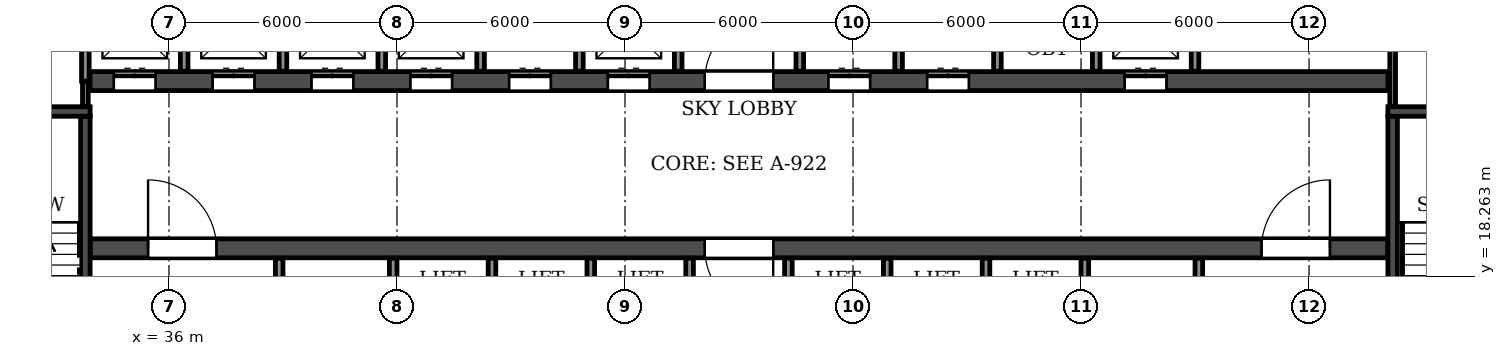
"""IFC4 building model, lengths in metres.
Left out: names, types, materials, properties, quantities, classifications, styles, units other than length and angle.
Written with IfcOpenShell. Run it as: python <this file> out.ifc"""

import sys

from ifc_helpers import new_model, si_unit, direction, frame, frame_2d, origin, place, context, subcontext, project, spatial, rectangle, extrude, element, fill, save


model = new_model("IFC4")
c1 = context("Model", 3, precision=1e-05, world=origin(), true_north=direction((0.0, 1.0)))
c2 = subcontext(c1, "Body", "Model", "MODEL_VIEW")
j1 = project(units=[si_unit("LENGTHUNIT", "METRE"), si_unit("PLANEANGLEUNIT", "RADIAN")], contexts=[c1])
p1 = place(None, origin())
s1 = spatial("IfcSite", under=j1, at=p1, CompositionType="ELEMENT")
p2 = place(p1, origin())
s2 = spatial("IfcBuilding", under=s1, at=p2, CompositionType="ELEMENT")
p3 = place(p2, frame((0.0, 0.0, 115.8)))
s3 = spatial("IfcBuildingStorey", under=s2, at=p3, CompositionType="ELEMENT", Elevation=115.8)
p4 = place(p3, frame((33.925, 19.0, 0.0), z_axis=(0.0, 0.0, 1.0), x_axis=(1.0, 0.0, 0.0)))
e1 = element("IfcWall", 1, at=p4, inside=s3, PredefinedType="SOLIDWALL", context=c2, shape_type="SweptSolid", body=[
    extrude(rectangle(XDim=34.15, YDim=0.5, at=frame_2d((17.075, 0.0))), origin(), (0.0, 0.0, 1.0), 6.37),
])
p5 = place(p4, frame((16.175, 0.0, 0.0)))
e2 = element("IfcOpeningElement", 2, at=p5, cuts=e1, PredefinedType="OPENING", context=c2, shape_type="SweptSolid", body=[
    extrude(rectangle(XDim=1.8, YDim=2.1, at=frame_2d((0.9, 1.05))), frame((0.0, 0.26, 0.0), z_axis=(0.0, -1.0, 0.0), x_axis=(1.0, 0.0, 0.0)), (0.0, 0.0, 1.0), 0.52),
])
p6 = place(p4, frame((1.525, 0.0, 0.0)))
e3 = element("IfcOpeningElement", 3, at=p6, cuts=e1, PredefinedType="OPENING", context=c2, shape_type="SweptSolid", body=[
    extrude(rectangle(XDim=1.8, YDim=2.1, at=frame_2d((0.9, 1.05))), frame((0.0, 0.26, 0.0), z_axis=(0.0, -1.0, 0.0), x_axis=(1.0, 0.0, 0.0)), (0.0, 0.0, 1.0), 0.52),
])
p7 = place(p4, frame((30.825, 0.0, 0.0)))
e4 = element("IfcOpeningElement", 4, at=p7, cuts=e1, PredefinedType="OPENING", context=c2, shape_type="SweptSolid", body=[
    extrude(rectangle(XDim=1.8, YDim=2.1, at=frame_2d((0.9, 1.05))), frame((0.0, 0.26, 0.0), z_axis=(0.0, -1.0, 0.0), x_axis=(1.0, 0.0, 0.0)), (0.0, 0.0, 1.0), 0.52),
])
p8 = place(p3, frame((33.925, 23.4, 0.0), z_axis=(0.0, 0.0, 1.0), x_axis=(1.0, 0.0, 0.0)))
e5 = element("IfcWall", 5, at=p8, inside=s3, PredefinedType="SOLIDWALL", context=c2, shape_type="SweptSolid", body=[
    extrude(rectangle(XDim=34.15, YDim=0.5, at=frame_2d((17.075, 0.0))), origin(), (0.0, 0.0, 1.0), 6.37),
])
p9 = place(p8, frame((16.175, 0.0, 0.0)))
e6 = element("IfcOpeningElement", 6, at=p9, cuts=e5, PredefinedType="OPENING", context=c2, shape_type="SweptSolid", body=[
    extrude(rectangle(XDim=1.8, YDim=2.1, at=frame_2d((0.9, 1.05))), frame((0.0, 0.26, 0.0), z_axis=(0.0, -1.0, 0.0), x_axis=(1.0, 0.0, 0.0)), (0.0, 0.0, 1.0), 0.52),
])
p10 = place(p8, frame((0.625, 0.0, 0.0)))
e7 = element("IfcOpeningElement", 7, at=p10, cuts=e5, PredefinedType="OPENING", context=c2, shape_type="SweptSolid", body=[
    extrude(rectangle(XDim=1.1, YDim=2.1, at=frame_2d((0.55, 1.05))), frame((0.0, 0.26, 0.0), z_axis=(0.0, -1.0, 0.0), x_axis=(1.0, 0.0, 0.0)), (0.0, 0.0, 1.0), 0.52),
])
p11 = place(p8, frame((3.225, 0.0, 0.0)))
e8 = element("IfcOpeningElement", 8, at=p11, cuts=e5, PredefinedType="OPENING", context=c2, shape_type="SweptSolid", body=[
    extrude(rectangle(XDim=1.1, YDim=2.1, at=frame_2d((0.55, 1.05))), frame((0.0, 0.26, 0.0), z_axis=(0.0, -1.0, 0.0), x_axis=(1.0, 0.0, 0.0)), (0.0, 0.0, 1.0), 0.52),
])
p12 = place(p8, frame((5.825, 0.0, 0.0)))
e9 = element("IfcOpeningElement", 9, at=p12, cuts=e5, PredefinedType="OPENING", context=c2, shape_type="SweptSolid", body=[
    extrude(rectangle(XDim=1.1, YDim=2.1, at=frame_2d((0.55, 1.05))), frame((0.0, 0.26, 0.0), z_axis=(0.0, -1.0, 0.0), x_axis=(1.0, 0.0, 0.0)), (0.0, 0.0, 1.0), 0.52),
])
p13 = place(p8, frame((8.425, 0.0, 0.0)))
e10 = element("IfcOpeningElement", 10, at=p13, cuts=e5, PredefinedType="OPENING", context=c2, shape_type="SweptSolid", body=[
    extrude(rectangle(XDim=1.1, YDim=2.1, at=frame_2d((0.55, 1.05))), frame((0.0, 0.26, 0.0), z_axis=(0.0, -1.0, 0.0), x_axis=(1.0, 0.0, 0.0)), (0.0, 0.0, 1.0), 0.52),
])
p14 = place(p8, frame((11.025, 0.0, 0.0)))
e11 = element("IfcOpeningElement", 11, at=p14, cuts=e5, PredefinedType="OPENING", context=c2, shape_type="SweptSolid", body=[
    extrude(rectangle(XDim=1.1, YDim=2.1, at=frame_2d((0.55, 1.05))), frame((0.0, 0.26, 0.0), z_axis=(0.0, -1.0, 0.0), x_axis=(1.0, 0.0, 0.0)), (0.0, 0.0, 1.0), 0.52),
])
p15 = place(p8, frame((13.625, 0.0, 0.0)))
e12 = element("IfcOpeningElement", 12, at=p15, cuts=e5, PredefinedType="OPENING", context=c2, shape_type="SweptSolid", body=[
    extrude(rectangle(XDim=1.1, YDim=2.1, at=frame_2d((0.55, 1.05))), frame((0.0, 0.26, 0.0), z_axis=(0.0, -1.0, 0.0), x_axis=(1.0, 0.0, 0.0)), (0.0, 0.0, 1.0), 0.52),
])
p16 = place(p8, frame((19.425, 0.0, 0.0)))
e13 = element("IfcOpeningElement", 13, at=p16, cuts=e5, PredefinedType="OPENING", context=c2, shape_type="SweptSolid", body=[
    extrude(rectangle(XDim=1.1, YDim=2.1, at=frame_2d((0.55, 1.05))), frame((0.0, 0.26, 0.0), z_axis=(0.0, -1.0, 0.0), x_axis=(1.0, 0.0, 0.0)), (0.0, 0.0, 1.0), 0.52),
])
p17 = place(p8, frame((22.025, 0.0, 0.0)))
e14 = element("IfcOpeningElement", 14, at=p17, cuts=e5, PredefinedType="OPENING", context=c2, shape_type="SweptSolid", body=[
    extrude(rectangle(XDim=1.1, YDim=2.1, at=frame_2d((0.55, 1.05))), frame((0.0, 0.26, 0.0), z_axis=(0.0, -1.0, 0.0), x_axis=(1.0, 0.0, 0.0)), (0.0, 0.0, 1.0), 0.52),
])
p18 = place(p8, frame((27.225, 0.0, 0.0)))
e15 = element("IfcOpeningElement", 15, at=p18, cuts=e5, PredefinedType="OPENING", context=c2, shape_type="SweptSolid", body=[
    extrude(rectangle(XDim=1.1, YDim=2.1, at=frame_2d((0.55, 1.05))), frame((0.0, 0.26, 0.0), z_axis=(0.0, -1.0, 0.0), x_axis=(1.0, 0.0, 0.0)), (0.0, 0.0, 1.0), 0.52),
])
p19 = place(p3, frame((33.8, 14.85, 0.0), z_axis=(0.0, 0.0, 1.0), x_axis=(0.0, 1.0, 0.0)))
e16 = element("IfcWall", 16, at=p19, inside=s3, PredefinedType="SOLIDWALL", context=c2, shape_type="SweptSolid", body=[
    extrude(rectangle(XDim=7.625, YDim=0.25, at=frame_2d((3.812, 0.0))), origin(), (0.0, 0.0, 1.0), 6.37),
])
p20 = place(p19, frame((0.45, 0.0, 0.0)))
e17 = element("IfcOpeningElement", 17, at=p20, cuts=e16, PredefinedType="OPENING", context=c2, shape_type="SweptSolid", body=[
    extrude(rectangle(XDim=1.0, YDim=2.1, at=frame_2d((0.5, 1.05))), frame((0.0, 0.135, 0.0), z_axis=(0.0, -1.0, 0.0), x_axis=(1.0, 0.0, 0.0)), (0.0, 0.0, 1.0), 0.27),
])
p21 = place(p3, frame((29.875, 22.6, 0.0), z_axis=(0.0, 0.0, 1.0), x_axis=(1.0, 0.0, 0.0)))
e18 = element("IfcWall", 18, at=p21, inside=s3, PredefinedType="SOLIDWALL", context=c2, shape_type="SweptSolid", body=[
    extrude(rectangle(XDim=4.05, YDim=0.25, at=frame_2d((2.025, 0.0))), origin(), (0.0, 0.0, 1.0), 6.37),
])
p22 = place(p3, frame((68.2, 14.85, 0.0), z_axis=(0.0, 0.0, 1.0), x_axis=(0.0, 1.0, 0.0)))
e19 = element("IfcWall", 19, at=p22, inside=s3, PredefinedType="SOLIDWALL", context=c2, shape_type="SweptSolid", body=[
    extrude(rectangle(XDim=7.625, YDim=0.25, at=frame_2d((3.812, 0.0))), origin(), (0.0, 0.0, 1.0), 6.37),
])
p23 = place(p22, frame((0.45, 0.0, 0.0)))
e20 = element("IfcOpeningElement", 20, at=p23, cuts=e19, PredefinedType="OPENING", context=c2, shape_type="SweptSolid", body=[
    extrude(rectangle(XDim=1.0, YDim=2.1, at=frame_2d((0.5, 1.05))), frame((0.0, 0.135, 0.0), z_axis=(0.0, -1.0, 0.0), x_axis=(1.0, 0.0, 0.0)), (0.0, 0.0, 1.0), 0.27),
])
p24 = place(p3, frame((68.075, 22.6, 0.0), z_axis=(0.0, 0.0, 1.0), x_axis=(1.0, 0.0, 0.0)))
e21 = element("IfcWall", 21, at=p24, inside=s3, PredefinedType="SOLIDWALL", context=c2, shape_type="SweptSolid", body=[
    extrude(rectangle(XDim=4.05, YDim=0.25, at=frame_2d((2.025, 0.0))), origin(), (0.0, 0.0, 1.0), 6.37),
])
p25 = place(p3, frame((33.8, 22.735, 0.0), z_axis=(0.0, 0.0, 1.0), x_axis=(0.0, 1.0, 0.0)))
e22 = element("IfcWall", 22, at=p25, inside=s3, PredefinedType="PARTITIONING", context=c2, shape_type="SweptSolid", body=[
    extrude(rectangle(XDim=0.665, YDim=0.15, at=frame_2d((0.333, 0.0))), origin(), (0.0, 0.0, 1.0), 6.37),
])
p26 = place(p3, frame((68.2, 22.735, 0.0), z_axis=(0.0, 0.0, 1.0), x_axis=(0.0, 1.0, 0.0)))
e23 = element("IfcWall", 23, at=p26, inside=s3, PredefinedType="PARTITIONING", context=c2, shape_type="SweptSolid", body=[
    extrude(rectangle(XDim=4.755, YDim=0.15, at=frame_2d((2.377, 0.0))), origin(), (0.0, 0.0, 1.0), 6.37),
])
p27 = place(p3, frame((33.8, 23.4, 0.0), z_axis=(0.0, 0.0, 1.0), x_axis=(0.0, 1.0, 0.0)))
e24 = element("IfcWall", 24, at=p27, inside=s3, PredefinedType="PARTITIONING", context=c2, shape_type="SweptSolid", body=[
    extrude(rectangle(XDim=2.7, YDim=0.2, at=frame_2d((1.35, 0.0))), origin(), (0.0, 0.0, 1.0), 6.37),
])
p28 = place(p3, frame((36.4, 23.66, 0.0), z_axis=(0.0, 0.0, 1.0), x_axis=(0.0, 1.0, 0.0)))
e25 = element("IfcWall", 25, at=p28, inside=s3, PredefinedType="PARTITIONING", context=c2, shape_type="SweptSolid", body=[
    extrude(rectangle(XDim=2.44, YDim=0.2, at=frame_2d((1.22, 0.0))), origin(), (0.0, 0.0, 1.0), 6.37),
])
p29 = place(p3, frame((38.9, 14.91, 0.0), z_axis=(0.0, 0.0, 1.0), x_axis=(0.0, 1.0, 0.0)))
e26 = element("IfcWall", 26, at=p29, inside=s3, PredefinedType="PARTITIONING", context=c2, shape_type="SweptSolid", body=[
    extrude(rectangle(XDim=3.83, YDim=0.2, at=frame_2d((1.915, 0.0))), origin(), (0.0, 0.0, 1.0), 6.37),
])
p30 = place(p29, frame((1.34, 0.0, 0.0)))
e27 = element("IfcOpeningElement", 27, at=p30, cuts=e26, PredefinedType="OPENING", context=c2, shape_type="SweptSolid", body=[
    extrude(rectangle(XDim=1.1, YDim=2.1, at=frame_2d((0.55, 1.05))), frame((0.0, 0.11, 0.0), z_axis=(0.0, -1.0, 0.0), x_axis=(1.0, 0.0, 0.0)), (0.0, 0.0, 1.0), 0.22),
])
for number, where, z_axis, x_axis in (
    (28, (39.0, 23.66, 0.0), (0.0, 0.0, 1.0), (0.0, 1.0, 0.0)),
    (29, (41.6, 23.66, 0.0), (0.0, 0.0, 1.0), (0.0, 1.0, 0.0)),
):
    element("IfcWall", number, at=place(p3, frame(where, z_axis=z_axis, x_axis=x_axis)), inside=s3, PredefinedType="PARTITIONING", context=c2, shape_type="SweptSolid", body=[
        extrude(rectangle(XDim=2.44, YDim=0.2, at=frame_2d((1.22, 0.0))), origin(), (0.0, 0.0, 1.0), 6.37),
    ])
for number, where, z_axis, x_axis in (
    (30, (41.9, 14.91, 0.0), (0.0, 0.0, 1.0), (0.0, 1.0, 0.0)),
    (31, (44.2, 23.66, 0.0), (0.0, 0.0, 1.0), (0.0, 1.0, 0.0)),
):
    element("IfcWall", number, at=place(p3, frame(where, z_axis=z_axis, x_axis=x_axis)), inside=s3, PredefinedType="PARTITIONING", context=c2, shape_type="SweptSolid", body=[
        extrude(rectangle(XDim=3.83, YDim=0.2, at=frame_2d((1.915, 0.0))), origin(), (0.0, 0.0, 1.0), 6.37),
    ])
p31 = place(p3, frame((44.5, 16.3, 0.0), z_axis=(0.0, 0.0, 1.0), x_axis=(0.0, 1.0, 0.0)))
e32 = element("IfcWall", 32, at=p31, inside=s3, PredefinedType="PARTITIONING", context=c2, shape_type="SweptSolid", body=[
    extrude(rectangle(XDim=2.44, YDim=0.2, at=frame_2d((1.22, 0.0))), origin(), (0.0, 0.0, 1.0), 6.37),
])
p32 = place(p3, frame((46.8, 23.66, 0.0), z_axis=(0.0, 0.0, 1.0), x_axis=(0.0, 1.0, 0.0)))
e33 = element("IfcWall", 33, at=p32, inside=s3, PredefinedType="PARTITIONING", context=c2, shape_type="SweptSolid", body=[
    extrude(rectangle(XDim=3.83, YDim=0.2, at=frame_2d((1.915, 0.0))), origin(), (0.0, 0.0, 1.0), 6.37),
])
p33 = place(p3, frame((47.1, 16.3, 0.0), z_axis=(0.0, 0.0, 1.0), x_axis=(0.0, 1.0, 0.0)))
e34 = element("IfcWall", 34, at=p33, inside=s3, PredefinedType="PARTITIONING", context=c2, shape_type="SweptSolid", body=[
    extrude(rectangle(XDim=2.44, YDim=0.2, at=frame_2d((1.22, 0.0))), origin(), (0.0, 0.0, 1.0), 6.37),
])
p34 = place(p3, frame((49.4, 23.66, 0.0), z_axis=(0.0, 0.0, 1.0), x_axis=(0.0, 1.0, 0.0)))
e35 = element("IfcWall", 35, at=p34, inside=s3, PredefinedType="PARTITIONING", context=c2, shape_type="SweptSolid", body=[
    extrude(rectangle(XDim=2.44, YDim=0.2, at=frame_2d((1.22, 0.0))), origin(), (0.0, 0.0, 1.0), 6.37),
])
for number, where, z_axis, x_axis in (
    (36, (49.7, 16.3, 0.0), (0.0, 0.0, 1.0), (0.0, 1.0, 0.0)),
    (37, (52.3, 16.3, 0.0), (0.0, 0.0, 1.0), (0.0, 1.0, 0.0)),
):
    element("IfcWall", number, at=place(p3, frame(where, z_axis=z_axis, x_axis=x_axis)), inside=s3, PredefinedType="PARTITIONING", context=c2, shape_type="SweptSolid", body=[
        extrude(rectangle(XDim=2.44, YDim=0.2, at=frame_2d((1.22, 0.0))), origin(), (0.0, 0.0, 1.0), 6.37),
    ])
p35 = place(p3, frame((52.6, 23.66, 0.0), z_axis=(0.0, 0.0, 1.0), x_axis=(0.0, 1.0, 0.0)))
e38 = element("IfcWall", 38, at=p35, inside=s3, PredefinedType="PARTITIONING", context=c2, shape_type="SweptSolid", body=[
    extrude(rectangle(XDim=2.44, YDim=0.2, at=frame_2d((1.22, 0.0))), origin(), (0.0, 0.0, 1.0), 6.37),
])
p36 = place(p3, frame((54.9, 16.3, 0.0), z_axis=(0.0, 0.0, 1.0), x_axis=(0.0, 1.0, 0.0)))
e39 = element("IfcWall", 39, at=p36, inside=s3, PredefinedType="PARTITIONING", context=c2, shape_type="SweptSolid", body=[
    extrude(rectangle(XDim=2.44, YDim=0.2, at=frame_2d((1.22, 0.0))), origin(), (0.0, 0.0, 1.0), 6.37),
])
p37 = place(p3, frame((55.2, 23.66, 0.0), z_axis=(0.0, 0.0, 1.0), x_axis=(0.0, 1.0, 0.0)))
e40 = element("IfcWall", 40, at=p37, inside=s3, PredefinedType="PARTITIONING", context=c2, shape_type="SweptSolid", body=[
    extrude(rectangle(XDim=2.44, YDim=0.2, at=frame_2d((1.22, 0.0))), origin(), (0.0, 0.0, 1.0), 6.37),
])
p38 = place(p3, frame((57.5, 16.3, 0.0), z_axis=(0.0, 0.0, 1.0), x_axis=(0.0, 1.0, 0.0)))
e41 = element("IfcWall", 41, at=p38, inside=s3, PredefinedType="PARTITIONING", context=c2, shape_type="SweptSolid", body=[
    extrude(rectangle(XDim=2.44, YDim=0.2, at=frame_2d((1.22, 0.0))), origin(), (0.0, 0.0, 1.0), 6.37),
])
p39 = place(p3, frame((57.8, 23.66, 0.0), z_axis=(0.0, 0.0, 1.0), x_axis=(0.0, 1.0, 0.0)))
e42 = element("IfcWall", 42, at=p39, inside=s3, PredefinedType="PARTITIONING", context=c2, shape_type="SweptSolid", body=[
    extrude(rectangle(XDim=2.44, YDim=0.2, at=frame_2d((1.22, 0.0))), origin(), (0.0, 0.0, 1.0), 6.37),
])
p40 = place(p3, frame((60.1, 14.91, 0.0), z_axis=(0.0, 0.0, 1.0), x_axis=(0.0, 1.0, 0.0)))
e43 = element("IfcWall", 43, at=p40, inside=s3, PredefinedType="PARTITIONING", context=c2, shape_type="SweptSolid", body=[
    extrude(rectangle(XDim=3.83, YDim=0.2, at=frame_2d((1.915, 0.0))), origin(), (0.0, 0.0, 1.0), 6.37),
])
for number, where, z_axis, x_axis in (
    (44, (60.4, 23.66, 0.0), (0.0, 0.0, 1.0), (0.0, 1.0, 0.0)),
    (45, (63.0, 23.66, 0.0), (0.0, 0.0, 1.0), (0.0, 1.0, 0.0)),
):
    element("IfcWall", number, at=place(p3, frame(where, z_axis=z_axis, x_axis=x_axis)), inside=s3, PredefinedType="PARTITIONING", context=c2, shape_type="SweptSolid", body=[
        extrude(rectangle(XDim=2.44, YDim=0.2, at=frame_2d((1.22, 0.0))), origin(), (0.0, 0.0, 1.0), 6.37),
    ])
p41 = place(p3, frame((63.1, 14.91, 0.0), z_axis=(0.0, 0.0, 1.0), x_axis=(0.0, 1.0, 0.0)))
e46 = element("IfcWall", 46, at=p41, inside=s3, PredefinedType="PARTITIONING", context=c2, shape_type="SweptSolid", body=[
    extrude(rectangle(XDim=3.83, YDim=0.2, at=frame_2d((1.915, 0.0))), origin(), (0.0, 0.0, 1.0), 6.37),
])
p42 = place(p41, frame((1.34, 0.0, 0.0)))
e47 = element("IfcOpeningElement", 47, at=p42, cuts=e46, PredefinedType="OPENING", context=c2, shape_type="SweptSolid", body=[
    extrude(rectangle(XDim=1.1, YDim=2.1, at=frame_2d((0.55, 1.05))), frame((0.0, 0.11, 0.0), z_axis=(0.0, -1.0, 0.0), x_axis=(1.0, 0.0, 0.0)), (0.0, 0.0, 1.0), 0.22),
])
p43 = place(p9, origin())
e48 = element("IfcDoor", 48, at=p43, inside=s3, OperationType="DOUBLE_DOOR_SINGLE_SWING", PredefinedType="DOOR", context=c2, shape_type="SweptSolid", body=[
    extrude(rectangle(XDim=1.8, YDim=2.1, at=frame_2d((0.9, 1.05))), frame((0.0, 0.025, 0.0), z_axis=(0.0, -1.0, 0.0), x_axis=(1.0, 0.0, 0.0)), (0.0, 0.0, 1.0), 0.05),
])
fill(e6, e48)
p44 = place(p5, frame((1.8, 0.0, 0.0), z_axis=(0.0, 0.0, 1.0), x_axis=(-1.0, 0.0, 0.0)))
e49 = element("IfcDoor", 49, at=p44, inside=s3, OperationType="DOUBLE_DOOR_SINGLE_SWING", PredefinedType="DOOR", context=c2, shape_type="SweptSolid", body=[
    extrude(rectangle(XDim=1.8, YDim=2.1, at=frame_2d((0.9, 1.05))), frame((0.0, 0.025, 0.0), z_axis=(0.0, -1.0, 0.0), x_axis=(1.0, 0.0, 0.0)), (0.0, 0.0, 1.0), 0.05),
])
fill(e2, e49)
p45 = place(p10, origin())
e50 = element("IfcDoor", 50, at=p45, inside=s3, OperationType="DOUBLE_DOOR_SLIDING", PredefinedType="DOOR", context=c2, shape_type="SweptSolid", body=[
    extrude(rectangle(XDim=1.1, YDim=2.1, at=frame_2d((0.55, 1.05))), frame((0.0, 0.025, 0.0), z_axis=(0.0, -1.0, 0.0), x_axis=(1.0, 0.0, 0.0)), (0.0, 0.0, 1.0), 0.05),
])
fill(e7, e50)
p46 = place(p6, origin())
e51 = element("IfcDoor", 51, at=p46, inside=s3, OperationType="DOUBLE_DOOR_SINGLE_SWING", PredefinedType="DOOR", context=c2, shape_type="SweptSolid", body=[
    extrude(rectangle(XDim=1.8, YDim=2.1, at=frame_2d((0.9, 1.05))), frame((0.0, 0.025, 0.0), z_axis=(0.0, -1.0, 0.0), x_axis=(1.0, 0.0, 0.0)), (0.0, 0.0, 1.0), 0.05),
])
fill(e3, e51)
p47 = place(p11, origin())
e52 = element("IfcDoor", 52, at=p47, inside=s3, OperationType="DOUBLE_DOOR_SLIDING", PredefinedType="DOOR", context=c2, shape_type="SweptSolid", body=[
    extrude(rectangle(XDim=1.1, YDim=2.1, at=frame_2d((0.55, 1.05))), frame((0.0, 0.025, 0.0), z_axis=(0.0, -1.0, 0.0), x_axis=(1.0, 0.0, 0.0)), (0.0, 0.0, 1.0), 0.05),
])
fill(e8, e52)
p48 = place(p12, origin())
e53 = element("IfcDoor", 53, at=p48, inside=s3, OperationType="DOUBLE_DOOR_SLIDING", PredefinedType="DOOR", context=c2, shape_type="SweptSolid", body=[
    extrude(rectangle(XDim=1.1, YDim=2.1, at=frame_2d((0.55, 1.05))), frame((0.0, 0.025, 0.0), z_axis=(0.0, -1.0, 0.0), x_axis=(1.0, 0.0, 0.0)), (0.0, 0.0, 1.0), 0.05),
])
fill(e9, e53)
p49 = place(p13, origin())
e54 = element("IfcDoor", 54, at=p49, inside=s3, OperationType="DOUBLE_DOOR_SLIDING", PredefinedType="DOOR", context=c2, shape_type="SweptSolid", body=[
    extrude(rectangle(XDim=1.1, YDim=2.1, at=frame_2d((0.55, 1.05))), frame((0.0, 0.025, 0.0), z_axis=(0.0, -1.0, 0.0), x_axis=(1.0, 0.0, 0.0)), (0.0, 0.0, 1.0), 0.05),
])
fill(e10, e54)
p50 = place(p14, origin())
e55 = element("IfcDoor", 55, at=p50, inside=s3, OperationType="DOUBLE_DOOR_SLIDING", PredefinedType="DOOR", context=c2, shape_type="SweptSolid", body=[
    extrude(rectangle(XDim=1.1, YDim=2.1, at=frame_2d((0.55, 1.05))), frame((0.0, 0.025, 0.0), z_axis=(0.0, -1.0, 0.0), x_axis=(1.0, 0.0, 0.0)), (0.0, 0.0, 1.0), 0.05),
])
fill(e11, e55)
p51 = place(p15, origin())
e56 = element("IfcDoor", 56, at=p51, inside=s3, OperationType="DOUBLE_DOOR_SLIDING", PredefinedType="DOOR", context=c2, shape_type="SweptSolid", body=[
    extrude(rectangle(XDim=1.1, YDim=2.1, at=frame_2d((0.55, 1.05))), frame((0.0, 0.025, 0.0), z_axis=(0.0, -1.0, 0.0), x_axis=(1.0, 0.0, 0.0)), (0.0, 0.0, 1.0), 0.05),
])
fill(e12, e56)
p52 = place(p16, origin())
e57 = element("IfcDoor", 57, at=p52, inside=s3, OperationType="DOUBLE_DOOR_SLIDING", PredefinedType="DOOR", context=c2, shape_type="SweptSolid", body=[
    extrude(rectangle(XDim=1.1, YDim=2.1, at=frame_2d((0.55, 1.05))), frame((0.0, 0.025, 0.0), z_axis=(0.0, -1.0, 0.0), x_axis=(1.0, 0.0, 0.0)), (0.0, 0.0, 1.0), 0.05),
])
fill(e13, e57)
p53 = place(p17, origin())
e58 = element("IfcDoor", 58, at=p53, inside=s3, OperationType="DOUBLE_DOOR_SLIDING", PredefinedType="DOOR", context=c2, shape_type="SweptSolid", body=[
    extrude(rectangle(XDim=1.1, YDim=2.1, at=frame_2d((0.55, 1.05))), frame((0.0, 0.025, 0.0), z_axis=(0.0, -1.0, 0.0), x_axis=(1.0, 0.0, 0.0)), (0.0, 0.0, 1.0), 0.05),
])
fill(e14, e58)
p54 = place(p18, origin())
e59 = element("IfcDoor", 59, at=p54, inside=s3, OperationType="DOUBLE_DOOR_SLIDING", PredefinedType="DOOR", context=c2, shape_type="SweptSolid", body=[
    extrude(rectangle(XDim=1.1, YDim=2.1, at=frame_2d((0.55, 1.05))), frame((0.0, 0.025, 0.0), z_axis=(0.0, -1.0, 0.0), x_axis=(1.0, 0.0, 0.0)), (0.0, 0.0, 1.0), 0.05),
])
fill(e15, e59)
p55 = place(p7, origin())
e60 = element("IfcDoor", 60, at=p55, inside=s3, OperationType="DOUBLE_DOOR_SINGLE_SWING", PredefinedType="DOOR", context=c2, shape_type="SweptSolid", body=[
    extrude(rectangle(XDim=1.8, YDim=2.1, at=frame_2d((0.9, 1.05))), frame((0.0, 0.025, 0.0), z_axis=(0.0, -1.0, 0.0), x_axis=(1.0, 0.0, 0.0)), (0.0, 0.0, 1.0), 0.05),
])
fill(e4, e60)
save(model, sys.argv[1])
